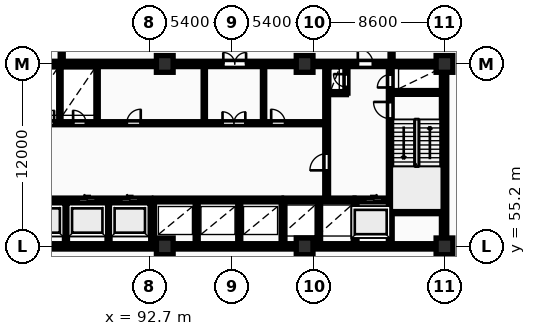
"""IFC4 building model, lengths in metres.
Left out: names, types, materials, properties, quantities, classifications, styles, units other than length and angle.
Written with IfcOpenShell. Run it as: python <this file> out.ifc"""

import sys

from ifc_helpers import new_model, si_unit, direction, frame, frame_2d, origin, origin_2d, place, context, subcontext, project, spatial, rectangle, extrude, element, fill, save


model = new_model("IFC4")
c1 = context("Model", 3, precision=1e-05, world=origin(), true_north=direction((0.0, 1.0)))
c2 = subcontext(c1, "Body", "Model", "MODEL_VIEW")
j1 = project(units=[si_unit("LENGTHUNIT", "METRE"), si_unit("PLANEANGLEUNIT", "RADIAN")], contexts=[c1])
p1 = place(None, origin())
s1 = spatial("IfcSite", under=j1, at=p1, CompositionType="ELEMENT")
p2 = place(p1, origin())
s2 = spatial("IfcBuilding", under=s1, at=p2, CompositionType="ELEMENT")
p3 = place(p2, frame((0.0, 0.0, 14.5)))
s3 = spatial("IfcBuildingStorey", under=s2, at=p3, CompositionType="ELEMENT", Elevation=14.5)
for number, where, z_axis, x_axis in (
    (1, (93.7, 55.2, 0.0), (0.0, 0.0, 1.0), (1.0, 0.0, 0.0)),
    (2, (93.7, 67.2, 0.0), (0.0, 0.0, 1.0), (1.0, 0.0, 0.0)),
    (3, (102.9, 55.2, 0.0), (0.0, 0.0, 1.0), (1.0, 0.0, 0.0)),
    (4, (102.9, 67.2, 0.0), (0.0, 0.0, 1.0), (1.0, 0.0, 0.0)),
    (5, (112.1, 55.2, 0.0), (0.0, 0.0, 1.0), (1.0, 0.0, 0.0)),
    (6, (112.1, 67.2, 0.0), (0.0, 0.0, 1.0), (1.0, 0.0, 0.0)),
):
    element("IfcColumn", number, at=place(p3, frame(where, z_axis=z_axis, x_axis=x_axis)), inside=s3, PredefinedType="COLUMN", context=c2, shape_type="SweptSolid", body=[
        extrude(rectangle(XDim=1.1, YDim=1.1, at=origin_2d()), origin(), (0.0, 0.0, 1.0), 4.5),
    ])
p4 = place(p3, frame((75.95, 55.2, 0.0), z_axis=(0.0, 0.0, 1.0), x_axis=(1.0, 0.0, 0.0)))
e7 = element("IfcWall", 7, at=p4, inside=s3, PredefinedType="SHEAR", context=c2, shape_type="SweptSolid", body=[
    extrude(rectangle(XDim=36.3, YDim=0.35, at=frame_2d((18.15, 0.0))), origin(), (0.0, 0.0, 1.0), 4.5),
])
p5 = place(p3, frame((112.075, 55.375, 0.0), z_axis=(0.0, 0.0, 1.0), x_axis=(0.0, 1.0, 0.0)))
e8 = element("IfcWall", 8, at=p5, inside=s3, PredefinedType="SHEAR", context=c2, shape_type="SweptSolid", body=[
    extrude(rectangle(XDim=11.65, YDim=0.35, at=frame_2d((5.825, 0.0))), origin(), (0.0, 0.0, 1.0), 4.5),
])
p6 = place(p3, frame((75.95, 67.2, 0.0), z_axis=(0.0, 0.0, 1.0), x_axis=(1.0, 0.0, 0.0)))
e9 = element("IfcWall", 9, at=p6, inside=s3, PredefinedType="SHEAR", context=c2, shape_type="SweptSolid", body=[
    extrude(rectangle(XDim=36.3, YDim=0.35, at=frame_2d((18.15, 0.0))), origin(), (0.0, 0.0, 1.0), 4.5),
])
p7 = place(p6, frame((5.25, 0.0, 0.0)))
e10 = element("IfcOpeningElement", 10, at=p7, cuts=e9, PredefinedType="OPENING", context=c2, shape_type="SweptSolid", body=[
    extrude(rectangle(XDim=1.0, YDim=2.15, at=frame_2d((0.5, 1.075))), frame((0.0, 0.185, 0.0), z_axis=(0.0, -1.0, 0.0), x_axis=(1.0, 0.0, 0.0)), (0.0, 0.0, 1.0), 0.37),
])
p8 = place(p6, frame((21.6, 0.0, 0.0)))
e11 = element("IfcOpeningElement", 11, at=p8, cuts=e9, PredefinedType="OPENING", context=c2, shape_type="SweptSolid", body=[
    extrude(rectangle(XDim=1.5, YDim=2.2, at=frame_2d((0.75, 1.1))), frame((0.0, 0.185, 0.0), z_axis=(0.0, -1.0, 0.0), x_axis=(1.0, 0.0, 0.0)), (0.0, 0.0, 1.0), 0.37),
])
p9 = place(p6, frame((30.45, 0.0, 0.0)))
e12 = element("IfcOpeningElement", 12, at=p9, cuts=e9, PredefinedType="OPENING", context=c2, shape_type="SweptSolid", body=[
    extrude(rectangle(XDim=1.0, YDim=2.15, at=frame_2d((0.5, 1.075))), frame((0.0, 0.185, 0.0), z_axis=(0.0, -1.0, 0.0), x_axis=(1.0, 0.0, 0.0)), (0.0, 0.0, 1.0), 0.37),
])
for number, where, z_axis, x_axis in (
    (13, (87.2, 55.4, 0.0), (0.0, 0.0, 1.0), (0.0, 1.0, 0.0)),
    (14, (90.0, 55.4, 0.0), (0.0, 0.0, 1.0), (0.0, 1.0, 0.0)),
):
    element("IfcWall", number, at=place(p3, frame(where, z_axis=z_axis, x_axis=x_axis)), inside=s3, PredefinedType="PARTITIONING", context=c2, shape_type="SweptSolid", body=[
        extrude(rectangle(XDim=2.72, YDim=0.2, at=frame_2d((1.36, 0.0))), origin(), (0.0, 0.0, 1.0), 4.18),
    ])
p10 = place(p3, frame((84.42, 58.25, 0.0), z_axis=(0.0, 0.0, 1.0), x_axis=(1.0, 0.0, 0.0)))
e15 = element("IfcWall", 15, at=p10, inside=s3, PredefinedType="SHEAR", context=c2, shape_type="SweptSolid", body=[
    extrude(rectangle(XDim=8.36, YDim=0.25, at=frame_2d((4.18, 0.0))), origin(), (0.0, 0.0, 1.0), 4.5),
])
p11 = place(p10, frame((0.82, 0.0, 0.0)))
e16 = element("IfcOpeningElement", 16, at=p11, cuts=e15, PredefinedType="OPENING", context=c2, shape_type="SweptSolid", body=[
    extrude(rectangle(XDim=1.12, YDim=2.12, at=frame_2d((0.56, 1.06))), frame((0.0, 0.135, 0.0), z_axis=(0.0, -1.0, 0.0), x_axis=(1.0, 0.0, 0.0)), (0.0, 0.0, 1.0), 0.27),
])
p12 = place(p10, frame((3.62, 0.0, 0.0)))
e17 = element("IfcOpeningElement", 17, at=p12, cuts=e15, PredefinedType="OPENING", context=c2, shape_type="SweptSolid", body=[
    extrude(rectangle(XDim=1.12, YDim=2.12, at=frame_2d((0.56, 1.06))), frame((0.0, 0.135, 0.0), z_axis=(0.0, -1.0, 0.0), x_axis=(1.0, 0.0, 0.0)), (0.0, 0.0, 1.0), 0.27),
])
p13 = place(p10, frame((6.42, 0.0, 0.0)))
e18 = element("IfcOpeningElement", 18, at=p13, cuts=e15, PredefinedType="OPENING", context=c2, shape_type="SweptSolid", body=[
    extrude(rectangle(XDim=1.12, YDim=2.12, at=frame_2d((0.56, 1.06))), frame((0.0, 0.135, 0.0), z_axis=(0.0, -1.0, 0.0), x_axis=(1.0, 0.0, 0.0)), (0.0, 0.0, 1.0), 0.27),
])
p14 = place(p3, frame((92.9, 55.4, 0.0), z_axis=(0.0, 0.0, 1.0), x_axis=(0.0, 1.0, 0.0)))
e19 = element("IfcWall", 19, at=p14, inside=s3, PredefinedType="SHEAR", context=c2, shape_type="SweptSolid", body=[
    extrude(rectangle(XDim=2.85, YDim=0.25, at=frame_2d((1.425, 0.0))), origin(), (0.0, 0.0, 1.0), 4.5),
])
for number, where, z_axis, x_axis in (
    (20, (95.8, 55.4, 0.0), (0.0, 0.0, 1.0), (0.0, 1.0, 0.0)),
    (21, (98.6, 55.4, 0.0), (0.0, 0.0, 1.0), (0.0, 1.0, 0.0)),
):
    element("IfcWall", number, at=place(p3, frame(where, z_axis=z_axis, x_axis=x_axis)), inside=s3, PredefinedType="PARTITIONING", context=c2, shape_type="SweptSolid", body=[
        extrude(rectangle(XDim=2.72, YDim=0.2, at=frame_2d((1.36, 0.0))), origin(), (0.0, 0.0, 1.0), 4.18),
    ])
p15 = place(p3, frame((93.02, 58.25, 0.0), z_axis=(0.0, 0.0, 1.0), x_axis=(1.0, 0.0, 0.0)))
e22 = element("IfcWall", 22, at=p15, inside=s3, PredefinedType="SHEAR", context=c2, shape_type="SweptSolid", body=[
    extrude(rectangle(XDim=8.36, YDim=0.25, at=frame_2d((4.18, 0.0))), origin(), (0.0, 0.0, 1.0), 4.5),
])
p16 = place(p3, frame((101.48, 55.4, 0.0), z_axis=(0.0, 0.0, 1.0), x_axis=(0.0, 1.0, 0.0)))
e23 = element("IfcWall", 23, at=p16, inside=s3, PredefinedType="SHEAR", context=c2, shape_type="SweptSolid", body=[
    extrude(rectangle(XDim=2.85, YDim=0.25, at=frame_2d((1.425, 0.0))), origin(), (0.0, 0.0, 1.0), 4.5),
])
p17 = place(p3, frame((103.85, 55.4, 0.0), z_axis=(0.0, 0.0, 1.0), x_axis=(0.0, 1.0, 0.0)))
e24 = element("IfcWall", 24, at=p17, inside=s3, PredefinedType="PARTITIONING", context=c2, shape_type="SweptSolid", body=[
    extrude(rectangle(XDim=2.72, YDim=0.2, at=frame_2d((1.36, 0.0))), origin(), (0.0, 0.0, 1.0), 4.18),
])
p18 = place(p3, frame((101.55, 58.25, 0.0), z_axis=(0.0, 0.0, 1.0), x_axis=(1.0, 0.0, 0.0)))
e25 = element("IfcWall", 25, at=p18, inside=s3, PredefinedType="SHEAR", context=c2, shape_type="SweptSolid", body=[
    extrude(rectangle(XDim=4.6, YDim=0.25, at=frame_2d((2.3, 0.0))), origin(), (0.0, 0.0, 1.0), 4.5),
])
p19 = place(p3, frame((106.22, 55.4, 0.0), z_axis=(0.0, 0.0, 1.0), x_axis=(0.0, 1.0, 0.0)))
e26 = element("IfcWall", 26, at=p19, inside=s3, PredefinedType="SHEAR", context=c2, shape_type="SweptSolid", body=[
    extrude(rectangle(XDim=2.85, YDim=0.25, at=frame_2d((1.425, 0.0))), origin(), (0.0, 0.0, 1.0), 4.5),
])
p20 = place(p3, frame((106.22, 58.25, 0.0), z_axis=(0.0, 0.0, 1.0), x_axis=(1.0, 0.0, 0.0)))
e27 = element("IfcWall", 27, at=p20, inside=s3, PredefinedType="SHEAR", context=c2, shape_type="SweptSolid", body=[
    extrude(rectangle(XDim=2.46, YDim=0.25, at=frame_2d((1.23, 0.0))), origin(), (0.0, 0.0, 1.0), 4.5),
])
p21 = place(p20, frame((0.67, 0.0, 0.0)))
e28 = element("IfcOpeningElement", 28, at=p21, cuts=e27, PredefinedType="OPENING", context=c2, shape_type="SweptSolid", body=[
    extrude(rectangle(XDim=1.12, YDim=2.12, at=frame_2d((0.56, 1.06))), frame((0.0, 0.135, 0.0), z_axis=(0.0, -1.0, 0.0), x_axis=(1.0, 0.0, 0.0)), (0.0, 0.0, 1.0), 0.27),
])
for number, where, z_axis, x_axis in (
    (29, (86.8, 63.4, 0.0), (0.0, 0.0, 1.0), (0.0, 1.0, 0.0)),
    (30, (89.25, 63.4, 0.0), (0.0, 0.0, 1.0), (0.0, 1.0, 0.0)),
    (31, (96.3, 63.4, 0.0), (0.0, 0.0, 1.0), (0.0, 1.0, 0.0)),
    (32, (100.2, 63.4, 0.0), (0.0, 0.0, 1.0), (0.0, 1.0, 0.0)),
):
    element("IfcWall", number, at=place(p3, frame(where, z_axis=z_axis, x_axis=x_axis)), inside=s3, PredefinedType="PARTITIONING", context=c2, shape_type="SweptSolid", body=[
        extrude(rectangle(XDim=3.6, YDim=0.15, at=frame_2d((1.8, 0.0))), origin(), (0.0, 0.0, 1.0), 4.18),
    ])
p22 = place(p3, frame((84.42, 63.3, 0.0), z_axis=(0.0, 0.0, 1.0), x_axis=(1.0, 0.0, 0.0)))
e33 = element("IfcWall", 33, at=p22, inside=s3, PredefinedType="PARTITIONING", context=c2, shape_type="SweptSolid", body=[
    extrude(rectangle(XDim=19.83, YDim=0.2, at=frame_2d((9.915, 0.0))), origin(), (0.0, 0.0, 1.0), 4.18),
])
p23 = place(p22, frame((1.15, 0.0, 0.0)))
e34 = element("IfcOpeningElement", 34, at=p23, cuts=e33, PredefinedType="OPENING", context=c2, shape_type="SweptSolid", body=[
    extrude(rectangle(XDim=0.85, YDim=2.05, at=frame_2d((0.425, 1.025))), frame((0.0, 0.11, 0.0), z_axis=(0.0, -1.0, 0.0), x_axis=(1.0, 0.0, 0.0)), (0.0, 0.0, 1.0), 0.22),
])
p24 = place(p22, frame((3.25, 0.0, 0.0)))
e35 = element("IfcOpeningElement", 35, at=p24, cuts=e33, PredefinedType="OPENING", context=c2, shape_type="SweptSolid", body=[
    extrude(rectangle(XDim=0.85, YDim=2.05, at=frame_2d((0.425, 1.025))), frame((0.0, 0.11, 0.0), z_axis=(0.0, -1.0, 0.0), x_axis=(1.0, 0.0, 0.0)), (0.0, 0.0, 1.0), 0.22),
])
p25 = place(p22, frame((13.08, 0.0, 0.0)))
e36 = element("IfcOpeningElement", 36, at=p25, cuts=e33, PredefinedType="OPENING", context=c2, shape_type="SweptSolid", body=[
    extrude(rectangle(XDim=1.5, YDim=2.2, at=frame_2d((0.75, 1.1))), frame((0.0, 0.11, 0.0), z_axis=(0.0, -1.0, 0.0), x_axis=(1.0, 0.0, 0.0)), (0.0, 0.0, 1.0), 0.22),
])
p26 = place(p22, frame((6.78, 0.0, 0.0)))
e37 = element("IfcOpeningElement", 37, at=p26, cuts=e33, PredefinedType="OPENING", context=c2, shape_type="SweptSolid", body=[
    extrude(rectangle(XDim=0.92, YDim=2.08, at=frame_2d((0.46, 1.04))), frame((0.0, 0.11, 0.0), z_axis=(0.0, -1.0, 0.0), x_axis=(1.0, 0.0, 0.0)), (0.0, 0.0, 1.0), 0.22),
])
p27 = place(p22, frame((16.28, 0.0, 0.0)))
e38 = element("IfcOpeningElement", 38, at=p27, cuts=e33, PredefinedType="OPENING", context=c2, shape_type="SweptSolid", body=[
    extrude(rectangle(XDim=0.92, YDim=2.08, at=frame_2d((0.46, 1.04))), frame((0.0, 0.11, 0.0), z_axis=(0.0, -1.0, 0.0), x_axis=(1.0, 0.0, 0.0)), (0.0, 0.0, 1.0), 0.22),
])
p28 = place(p3, frame((104.45, 65.28, 0.0), z_axis=(0.0, 0.0, 1.0), x_axis=(1.0, 0.0, 0.0)))
e39 = element("IfcWall", 39, at=p28, inside=s3, PredefinedType="PARTITIONING", context=c2, shape_type="SweptSolid", body=[
    extrude(rectangle(XDim=1.2, YDim=0.2, at=frame_2d((0.6, 0.0))), origin(), (0.0, 0.0, 1.0), 4.18),
])
p29 = place(p3, frame((105.65, 65.28, 0.0), z_axis=(0.0, 0.0, 1.0), x_axis=(0.0, 1.0, 0.0)))
e40 = element("IfcWall", 40, at=p29, inside=s3, PredefinedType="PARTITIONING", context=c2, shape_type="SweptSolid", body=[
    extrude(rectangle(XDim=1.72, YDim=0.2, at=frame_2d((0.86, 0.0))), origin(), (0.0, 0.0, 1.0), 4.18),
])
p30 = place(p29, frame((0.4, 0.0, 0.0)))
e41 = element("IfcOpeningElement", 41, at=p30, cuts=e40, PredefinedType="OPENING", context=c2, shape_type="SweptSolid", body=[
    extrude(rectangle(XDim=0.85, YDim=2.05, at=frame_2d((0.425, 1.025))), frame((0.0, 0.11, 0.0), z_axis=(0.0, -1.0, 0.0), x_axis=(1.0, 0.0, 0.0)), (0.0, 0.0, 1.0), 0.22),
])
p31 = place(p3, frame((104.35, 58.4, 0.0), z_axis=(0.0, 0.0, 1.0), x_axis=(0.0, 1.0, 0.0)))
e42 = element("IfcWall", 42, at=p31, inside=s3, PredefinedType="SHEAR", context=c2, shape_type="SweptSolid", body=[
    extrude(rectangle(XDim=8.6, YDim=0.25, at=frame_2d((4.3, 0.0))), origin(), (0.0, 0.0, 1.0), 4.5),
])
p32 = place(p31, frame((1.8, 0.0, 0.0)))
e43 = element("IfcOpeningElement", 43, at=p32, cuts=e42, PredefinedType="OPENING", context=c2, shape_type="SweptSolid", body=[
    extrude(rectangle(XDim=1.1, YDim=2.1, at=frame_2d((0.55, 1.05))), frame((0.0, 0.135, 0.0), z_axis=(0.0, -1.0, 0.0), x_axis=(1.0, 0.0, 0.0)), (0.0, 0.0, 1.0), 0.27),
])
p33 = place(p3, frame((108.535, 55.4, 0.0), z_axis=(0.0, 0.0, 1.0), x_axis=(0.0, 1.0, 0.0)))
e44 = element("IfcWall", 44, at=p33, inside=s3, PredefinedType="SHEAR", context=c2, shape_type="SweptSolid", body=[
    extrude(rectangle(XDim=11.6, YDim=0.25, at=frame_2d((5.8, 0.0))), origin(), (0.0, 0.0, 1.0), 4.5),
])
p34 = place(p33, frame((8.2, 0.0, 0.0)))
e45 = element("IfcOpeningElement", 45, at=p34, cuts=e44, PredefinedType="OPENING", context=c2, shape_type="SweptSolid", body=[
    extrude(rectangle(XDim=1.1, YDim=2.1, at=frame_2d((0.55, 1.05))), frame((0.0, 0.135, 0.0), z_axis=(0.0, -1.0, 0.0), x_axis=(1.0, 0.0, 0.0)), (0.0, 0.0, 1.0), 0.27),
])
p35 = place(p33, frame((10.25, 0.0, 0.0)))
e46 = element("IfcOpeningElement", 46, at=p35, cuts=e44, PredefinedType="OPENING", context=c2, shape_type="SweptSolid", body=[
    extrude(rectangle(XDim=0.85, YDim=2.05, at=frame_2d((0.425, 1.025))), frame((0.0, 0.135, 0.0), z_axis=(0.0, -1.0, 0.0), x_axis=(1.0, 0.0, 0.0)), (0.0, 0.0, 1.0), 0.27),
])
for number, where, z_axis, x_axis in (
    (47, (108.66, 57.475, 0.0), (0.0, 0.0, 1.0), (1.0, 0.0, 0.0)),
    (48, (108.66, 65.325, 0.0), (0.0, 0.0, 1.0), (1.0, 0.0, 0.0)),
):
    element("IfcWall", number, at=place(p3, frame(where, z_axis=z_axis, x_axis=x_axis)), inside=s3, PredefinedType="SHEAR", context=c2, shape_type="SweptSolid", body=[
        extrude(rectangle(XDim=3.24, YDim=0.25, at=frame_2d((1.62, 0.0))), origin(), (0.0, 0.0, 1.0), 4.5),
    ])
p36 = place(p3, frame((86.92, 67.4, 0.0), z_axis=(0.0, 0.0, 1.0), x_axis=(0.0, 1.0, 0.0)))
e49 = element("IfcWall", 49, at=p36, inside=s3, PredefinedType="PARTITIONING", context=c2, shape_type="SweptSolid", body=[
    extrude(rectangle(XDim=34.12, YDim=0.2, at=frame_2d((17.06, 0.0))), origin(), (0.0, 0.0, 1.0), 4.18),
])
p37 = place(p36, frame((8.65, 0.0, 0.0)))
e50 = element("IfcOpeningElement", 50, at=p37, cuts=e49, PredefinedType="OPENING", context=c2, shape_type="SweptSolid", body=[
    extrude(rectangle(XDim=1.22, YDim=2.18, at=frame_2d((0.61, 1.09))), frame((0.0, 0.11, 0.0), z_axis=(0.0, -1.0, 0.0), x_axis=(1.0, 0.0, 0.0)), (0.0, 0.0, 1.0), 0.22),
])
p38 = place(p3, frame((108.62, 67.4, 0.0), z_axis=(0.0, 0.0, 1.0), x_axis=(0.0, 1.0, 0.0)))
e51 = element("IfcWall", 51, at=p38, inside=s3, PredefinedType="PARTITIONING", context=c2, shape_type="SweptSolid", body=[
    extrude(rectangle(XDim=34.12, YDim=0.2, at=frame_2d((17.06, 0.0))), origin(), (0.0, 0.0, 1.0), 4.18),
])
p39 = place(p38, frame((9.5, 0.0, 0.0)))
e52 = element("IfcOpeningElement", 52, at=p39, cuts=e51, PredefinedType="OPENING", context=c2, shape_type="SweptSolid", body=[
    extrude(rectangle(XDim=1.22, YDim=2.18, at=frame_2d((0.61, 1.09))), frame((0.0, 0.11, 0.0), z_axis=(0.0, -1.0, 0.0), x_axis=(1.0, 0.0, 0.0)), (0.0, 0.0, 1.0), 0.22),
])
p40 = place(p8, origin())
e53 = element("IfcDoor", 53, at=p40, inside=s3, OperationType="DOUBLE_DOOR_SINGLE_SWING", PredefinedType="DOOR", context=c2, shape_type="SweptSolid", body=[
    extrude(rectangle(XDim=1.5, YDim=2.2, at=frame_2d((0.75, 1.1))), frame((0.0, 0.025, 0.0), z_axis=(0.0, -1.0, 0.0), x_axis=(1.0, 0.0, 0.0)), (0.0, 0.0, 1.0), 0.05),
])
fill(e11, e53)
p41 = place(p9, origin())
e54 = element("IfcDoor", 54, at=p41, inside=s3, OperationType="SINGLE_SWING_LEFT", PredefinedType="DOOR", context=c2, shape_type="SweptSolid", body=[
    extrude(rectangle(XDim=1.0, YDim=2.15, at=frame_2d((0.5, 1.075))), frame((0.0, 0.025, 0.0), z_axis=(0.0, -1.0, 0.0), x_axis=(1.0, 0.0, 0.0)), (0.0, 0.0, 1.0), 0.05),
])
fill(e12, e54)
p42 = place(p11, origin())
e55 = element("IfcDoor", 55, at=p42, inside=s3, OperationType="SLIDING_TO_LEFT", PredefinedType="DOOR", context=c2, shape_type="SweptSolid", body=[
    extrude(rectangle(XDim=1.12, YDim=2.12, at=frame_2d((0.56, 1.06))), frame((0.0, 0.025, 0.0), z_axis=(0.0, -1.0, 0.0), x_axis=(1.0, 0.0, 0.0)), (0.0, 0.0, 1.0), 0.05),
])
fill(e16, e55)
p43 = place(p12, origin())
e56 = element("IfcDoor", 56, at=p43, inside=s3, OperationType="SLIDING_TO_LEFT", PredefinedType="DOOR", context=c2, shape_type="SweptSolid", body=[
    extrude(rectangle(XDim=1.12, YDim=2.12, at=frame_2d((0.56, 1.06))), frame((0.0, 0.025, 0.0), z_axis=(0.0, -1.0, 0.0), x_axis=(1.0, 0.0, 0.0)), (0.0, 0.0, 1.0), 0.05),
])
fill(e17, e56)
p44 = place(p13, origin())
e57 = element("IfcDoor", 57, at=p44, inside=s3, OperationType="SLIDING_TO_LEFT", PredefinedType="DOOR", context=c2, shape_type="SweptSolid", body=[
    extrude(rectangle(XDim=1.12, YDim=2.12, at=frame_2d((0.56, 1.06))), frame((0.0, 0.025, 0.0), z_axis=(0.0, -1.0, 0.0), x_axis=(1.0, 0.0, 0.0)), (0.0, 0.0, 1.0), 0.05),
])
fill(e18, e57)
p45 = place(p21, origin())
e58 = element("IfcDoor", 58, at=p45, inside=s3, OperationType="SLIDING_TO_RIGHT", PredefinedType="DOOR", context=c2, shape_type="SweptSolid", body=[
    extrude(rectangle(XDim=1.12, YDim=2.12, at=frame_2d((0.56, 1.06))), frame((0.0, 0.025, 0.0), z_axis=(0.0, -1.0, 0.0), x_axis=(1.0, 0.0, 0.0)), (0.0, 0.0, 1.0), 0.05),
])
fill(e28, e58)
p46 = place(p23, origin())
e59 = element("IfcDoor", 59, at=p46, inside=s3, OperationType="SINGLE_SWING_RIGHT", PredefinedType="DOOR", context=c2, shape_type="SweptSolid", body=[
    extrude(rectangle(XDim=0.85, YDim=2.05, at=frame_2d((0.425, 1.025))), frame((0.0, 0.025, 0.0), z_axis=(0.0, -1.0, 0.0), x_axis=(1.0, 0.0, 0.0)), (0.0, 0.0, 1.0), 0.05),
])
fill(e34, e59)
p47 = place(p24, origin())
e60 = element("IfcDoor", 60, at=p47, inside=s3, OperationType="SINGLE_SWING_LEFT", PredefinedType="DOOR", context=c2, shape_type="SweptSolid", body=[
    extrude(rectangle(XDim=0.85, YDim=2.05, at=frame_2d((0.425, 1.025))), frame((0.0, 0.025, 0.0), z_axis=(0.0, -1.0, 0.0), x_axis=(1.0, 0.0, 0.0)), (0.0, 0.0, 1.0), 0.05),
])
fill(e35, e60)
p48 = place(p25, origin())
e61 = element("IfcDoor", 61, at=p48, inside=s3, OperationType="DOUBLE_DOOR_SINGLE_SWING", PredefinedType="DOOR", context=c2, shape_type="SweptSolid", body=[
    extrude(rectangle(XDim=1.5, YDim=2.2, at=frame_2d((0.75, 1.1))), frame((0.0, 0.025, 0.0), z_axis=(0.0, -1.0, 0.0), x_axis=(1.0, 0.0, 0.0)), (0.0, 0.0, 1.0), 0.05),
])
fill(e36, e61)
p49 = place(p26, origin())
e62 = element("IfcDoor", 62, at=p49, inside=s3, OperationType="SINGLE_SWING_RIGHT", PredefinedType="DOOR", context=c2, shape_type="SweptSolid", body=[
    extrude(rectangle(XDim=0.92, YDim=2.08, at=frame_2d((0.46, 1.04))), frame((0.0, 0.025, 0.0), z_axis=(0.0, -1.0, 0.0), x_axis=(1.0, 0.0, 0.0)), (0.0, 0.0, 1.0), 0.05),
])
fill(e37, e62)
p50 = place(p27, origin())
e63 = element("IfcDoor", 63, at=p50, inside=s3, OperationType="SINGLE_SWING_LEFT", PredefinedType="DOOR", context=c2, shape_type="SweptSolid", body=[
    extrude(rectangle(XDim=0.92, YDim=2.08, at=frame_2d((0.46, 1.04))), frame((0.0, 0.025, 0.0), z_axis=(0.0, -1.0, 0.0), x_axis=(1.0, 0.0, 0.0)), (0.0, 0.0, 1.0), 0.05),
])
fill(e38, e63)
p51 = place(p30, origin())
e64 = element("IfcDoor", 64, at=p51, inside=s3, OperationType="SINGLE_SWING_RIGHT", PredefinedType="DOOR", context=c2, shape_type="SweptSolid", body=[
    extrude(rectangle(XDim=0.85, YDim=2.05, at=frame_2d((0.425, 1.025))), frame((0.0, 0.025, 0.0), z_axis=(0.0, -1.0, 0.0), x_axis=(1.0, 0.0, 0.0)), (0.0, 0.0, 1.0), 0.05),
])
fill(e41, e64)
p52 = place(p32, origin())
e65 = element("IfcDoor", 65, at=p52, inside=s3, OperationType="SINGLE_SWING_LEFT", PredefinedType="DOOR", context=c2, shape_type="SweptSolid", body=[
    extrude(rectangle(XDim=1.1, YDim=2.1, at=frame_2d((0.55, 1.05))), frame((0.0, 0.025, 0.0), z_axis=(0.0, -1.0, 0.0), x_axis=(1.0, 0.0, 0.0)), (0.0, 0.0, 1.0), 0.05),
])
fill(e43, e65)
p53 = place(p34, origin())
e66 = element("IfcDoor", 66, at=p53, inside=s3, OperationType="SINGLE_SWING_RIGHT", PredefinedType="DOOR", context=c2, shape_type="SweptSolid", body=[
    extrude(rectangle(XDim=1.1, YDim=2.1, at=frame_2d((0.55, 1.05))), frame((0.0, 0.025, 0.0), z_axis=(0.0, -1.0, 0.0), x_axis=(1.0, 0.0, 0.0)), (0.0, 0.0, 1.0), 0.05),
])
fill(e45, e66)
p54 = place(p35, origin())
e67 = element("IfcDoor", 67, at=p54, inside=s3, OperationType="SINGLE_SWING_LEFT", PredefinedType="DOOR", context=c2, shape_type="SweptSolid", body=[
    extrude(rectangle(XDim=0.85, YDim=2.05, at=frame_2d((0.425, 1.025))), frame((0.0, 0.025, 0.0), z_axis=(0.0, -1.0, 0.0), x_axis=(1.0, 0.0, 0.0)), (0.0, 0.0, 1.0), 0.05),
])
fill(e46, e67)
save(model, sys.argv[1])
